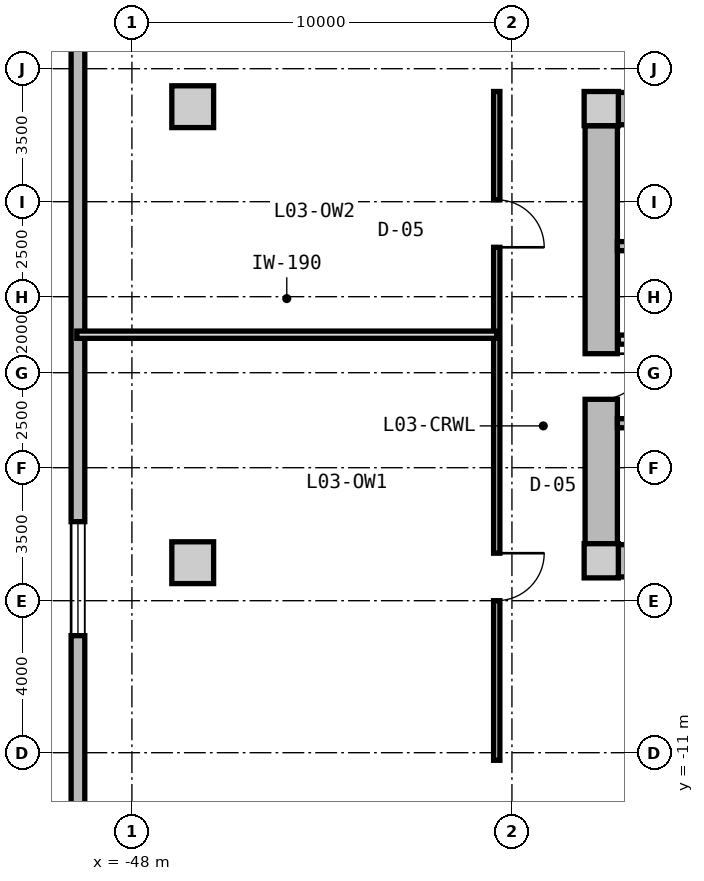
"""IFC4 building model, lengths in metres.
Left out: names, types, materials, properties, quantities, classifications, styles, units other than length and angle.
Written with IfcOpenShell. Run it as: python <this file> out.ifc"""

import sys

from ifc_helpers import new_model, si_unit, direction, frame, frame_2d, origin, origin_2d, place, context, subcontext, project, spatial, rectangle, extrude, source, transform, mapped, element, fill, save


model = new_model("IFC4")
c1 = context("Model", 3, precision=1e-05, world=origin(), true_north=direction((0.0, 1.0)))
c2 = subcontext(c1, "Body", "Model", "MODEL_VIEW")
j1 = project(units=[si_unit("LENGTHUNIT", "METRE"), si_unit("PLANEANGLEUNIT", "RADIAN")], contexts=[c1])
p1 = place(None, origin())
s1 = spatial("IfcSite", under=j1, at=p1, CompositionType="ELEMENT")
p2 = place(p1, origin())
s2 = spatial("IfcBuilding", under=s1, at=p2, CompositionType="ELEMENT")
p3 = place(p2, frame((0.0, 0.0, 12.6)))
s3 = spatial("IfcBuildingStorey", under=s2, at=p3, CompositionType="ELEMENT", Elevation=12.6)
m1 = source(origin(), c2, "Body", "SweptSolid", [
    extrude(rectangle(XDim=0.9, YDim=0.9, at=origin_2d()), origin(), (0.0, 0.0, 1.0), 4.2),
])
for number, where, z_axis, x_axis in (
    (1, (-35.65, -5.95, 0.0), (0.0, 0.0, 1.0), (1.0, 0.0, 0.0)),
    (2, (-35.65, 5.95, 0.0), (0.0, 0.0, 1.0), (1.0, 0.0, 0.0)),
):
    element("IfcColumn", number, at=place(p3, frame(where, z_axis=z_axis, x_axis=x_axis)), inside=s3, PredefinedType="COLUMN", context=c2, shape_type="MappedRepresentation", body=[
        mapped(m1, transform((0.0, 0.0, 0.0), x_axis=(1.0, 0.0, 0.0), y_axis=(0.0, 1.0, 0.0), z_axis=(0.0, 0.0, 1.0), scale=1.0)),
    ])
m2 = source(origin(), c2, "Body", "SweptSolid", [
    extrude(rectangle(XDim=14.4, YDim=0.85, at=frame_2d((7.2, 0.0))), origin(), (0.0, 0.0, 1.0), 3.88),
])
for number, where, z_axis, x_axis in (
    (3, (-35.2, 5.95, 0.0), (0.0, 0.0, 1.0), (1.0, 0.0, 0.0)),
    (4, (-20.8, -5.95, 0.0), (0.0, 0.0, 1.0), (-1.0, 0.0, 0.0)),
):
    element("IfcWall", number, at=place(p3, frame(where, z_axis=z_axis, x_axis=x_axis)), inside=s3, PredefinedType="SHEAR", context=c2, shape_type="MappedRepresentation", body=[
        mapped(m2, transform((0.0, 0.0, 0.0), x_axis=(1.0, 0.0, 0.0), y_axis=(0.0, 1.0, 0.0), z_axis=(0.0, 0.0, 1.0), scale=1.0)),
    ])
m3 = source(origin(), c2, "Body", "SweptSolid", [
    extrude(rectangle(XDim=11.0, YDim=0.85, at=frame_2d((5.5, 0.0))), origin(), (0.0, 0.0, 1.0), 3.88),
])
p4 = place(p3, frame((-35.65, -5.5, 0.0), z_axis=(0.0, 0.0, 1.0), x_axis=(0.0, 1.0, 0.0)))
e5 = element("IfcWall", 5, at=p4, inside=s3, PredefinedType="SHEAR", context=c2, shape_type="MappedRepresentation", body=[
    mapped(m3, transform((0.0, 0.0, 0.0), x_axis=(1.0, 0.0, 0.0), y_axis=(0.0, 1.0, 0.0), z_axis=(0.0, 0.0, 1.0), scale=1.0)),
])
p5 = place(p4, frame((3.8, 0.0, 0.0)))
e6 = element("IfcOpeningElement", 6, at=p5, cuts=e5, PredefinedType="OPENING", context=c2, shape_type="SweptSolid", body=[
    extrude(rectangle(XDim=1.2, YDim=2.15, at=frame_2d((0.6, 1.075))), frame((0.0, 0.435, 0.0), z_axis=(0.0, -1.0, 0.0), x_axis=(1.0, 0.0, 0.0)), (0.0, 0.0, 1.0), 0.87),
])
m4 = source(origin(), c2, "Body", "SweptSolid", [
    extrude(rectangle(XDim=1.1, YDim=1.1, at=origin_2d()), origin(), (0.0, 0.0, 1.0), 4.2),
])
for number, where, z_axis, x_axis in (
    (7, (-46.4, -6.0, 0.0), (0.0, 0.0, 1.0), (1.0, 0.0, 0.0)),
    (8, (-46.4, 6.0, 0.0), (0.0, 0.0, 1.0), (1.0, 0.0, 0.0)),
):
    element("IfcColumn", number, at=place(p3, frame(where, z_axis=z_axis, x_axis=x_axis)), inside=s3, PredefinedType="COLUMN", context=c2, shape_type="MappedRepresentation", body=[
        mapped(m4, transform((0.0, 0.0, 0.0), x_axis=(1.0, 0.0, 0.0), y_axis=(0.0, 1.0, 0.0), z_axis=(0.0, 0.0, 1.0), scale=1.0)),
    ])
m5 = source(origin(), c2, "Body", "SweptSolid", [
    extrude(rectangle(XDim=40.64, YDim=0.36, at=frame_2d((20.32, 0.0))), origin(), (0.0, 0.0, 1.0), 3.88),
])
p6 = place(p3, frame((-49.42, -20.32, 0.0), z_axis=(0.0, 0.0, 1.0), x_axis=(0.0, 1.0, 0.0)))
e9 = element("IfcWall", 9, at=p6, inside=s3, PredefinedType="SOLIDWALL", context=c2, shape_type="MappedRepresentation", body=[
    mapped(m5, transform((0.0, 0.0, 0.0), x_axis=(1.0, 0.0, 0.0), y_axis=(0.0, 1.0, 0.0), z_axis=(0.0, 0.0, 1.0), scale=1.0)),
])
p7 = place(p6, frame((12.4, 0.0, 0.85)))
e10 = element("IfcOpeningElement", 10, at=p7, cuts=e9, PredefinedType="OPENING", context=c2, shape_type="SweptSolid", body=[
    extrude(rectangle(XDim=3.0, YDim=2.1, at=frame_2d((1.5, 1.05))), frame((0.0, 0.19, 0.0), z_axis=(0.0, -1.0, 0.0), x_axis=(1.0, 0.0, 0.0)), (0.0, 0.0, 1.0), 0.38),
])
m6 = source(origin(), c2, "Body", "SweptSolid", [
    extrude(rectangle(XDim=7.765, YDim=0.24, at=frame_2d((3.883, 0.0))), origin(), (0.0, 0.0, 1.0), 3.88),
])
p8 = place(p3, frame((-35.225, 2.33, 0.0), z_axis=(0.0, 0.0, 1.0), x_axis=(1.0, 0.0, 0.0)))
e11 = element("IfcWall", 11, at=p8, inside=s3, PredefinedType="PARTITIONING", context=c2, shape_type="MappedRepresentation", body=[
    mapped(m6, transform((0.0, 0.0, 0.0), x_axis=(1.0, 0.0, 0.0), y_axis=(0.0, 1.0, 0.0), z_axis=(0.0, 0.0, 1.0), scale=1.0)),
])
p9 = place(p3, frame((-35.225, -2.33, 0.0), z_axis=(0.0, 0.0, 1.0), x_axis=(1.0, 0.0, 0.0)))
e12 = element("IfcWall", 12, at=p9, inside=s3, PredefinedType="PARTITIONING", context=c2, shape_type="MappedRepresentation", body=[
    mapped(m6, transform((0.0, 0.0, 0.0), x_axis=(1.0, 0.0, 0.0), y_axis=(0.0, 1.0, 0.0), z_axis=(0.0, 0.0, 1.0), scale=1.0)),
])
p10 = place(p9, frame((0.885, 0.0, 0.0)))
e13 = element("IfcOpeningElement", 13, at=p10, cuts=e12, PredefinedType="OPENING", context=c2, shape_type="SweptSolid", body=[
    extrude(rectangle(XDim=1.1, YDim=2.15, at=frame_2d((0.55, 1.075))), frame((0.0, 0.13, 0.0), z_axis=(0.0, -1.0, 0.0), x_axis=(1.0, 0.0, 0.0)), (0.0, 0.0, 1.0), 0.26),
])
m7 = source(origin(), c2, "Body", "SweptSolid", [
    extrude(rectangle(XDim=7.62, YDim=0.24, at=frame_2d((3.81, 0.0))), origin(), (0.0, 0.0, 1.0), 3.865),
])
p11 = place(p3, frame((-35.2, -0.13, 0.0), z_axis=(0.0, 0.0, 1.0), x_axis=(1.0, 0.0, 0.0)))
e14 = element("IfcWall", 14, at=p11, inside=s3, PredefinedType="PARTITIONING", context=c2, shape_type="MappedRepresentation", body=[
    mapped(m7, transform((0.0, 0.0, 0.0), x_axis=(1.0, 0.0, 0.0), y_axis=(0.0, 1.0, 0.0), z_axis=(0.0, 0.0, 1.0), scale=1.0)),
])
p12 = place(p11, frame((6.22, 0.0, 0.0)))
e15 = element("IfcOpeningElement", 15, at=p12, cuts=e14, PredefinedType="OPENING", context=c2, shape_type="SweptSolid", body=[
    extrude(rectangle(XDim=1.0, YDim=2.1, at=frame_2d((0.5, 1.05))), frame((0.0, 0.13, 0.0), z_axis=(0.0, -1.0, 0.0), x_axis=(1.0, 0.0, 0.0)), (0.0, 0.0, 1.0), 0.26),
])
p13 = place(p11, frame((0.85, 0.0, 0.0)))
e16 = element("IfcOpeningElement", 16, at=p13, cuts=e14, PredefinedType="OPENING", context=c2, shape_type="SweptSolid", body=[
    extrude(rectangle(XDim=1.1, YDim=2.2, at=frame_2d((0.55, 1.1))), frame((0.0, 0.13, 0.0), z_axis=(0.0, -1.0, 0.0), x_axis=(1.0, 0.0, 0.0)), (0.0, 0.0, 1.0), 0.26),
])
p14 = place(p11, frame((3.85, 0.0, 0.0)))
e17 = element("IfcOpeningElement", 17, at=p14, cuts=e14, PredefinedType="OPENING", context=c2, shape_type="SweptSolid", body=[
    extrude(rectangle(XDim=1.1, YDim=2.2, at=frame_2d((0.55, 1.1))), frame((0.0, 0.13, 0.0), z_axis=(0.0, -1.0, 0.0), x_axis=(1.0, 0.0, 0.0)), (0.0, 0.0, 1.0), 0.26),
])
m8 = source(origin(), c2, "Body", "SweptSolid", [
    extrude(rectangle(XDim=17.6, YDim=0.165, at=frame_2d((8.8, 0.0))), origin(), (0.0, 0.0, 1.0), 3.865),
])
p15 = place(p3, frame((-38.4, -11.2, 0.0), z_axis=(0.0, 0.0, 1.0), x_axis=(0.0, 1.0, 0.0)))
e18 = element("IfcWall", 18, at=p15, inside=s3, PredefinedType="PARTITIONING", context=c2, shape_type="MappedRepresentation", body=[
    mapped(m8, transform((0.0, 0.0, 0.0), x_axis=(1.0, 0.0, 0.0), y_axis=(0.0, 1.0, 0.0), z_axis=(0.0, 0.0, 1.0), scale=1.0)),
])
p16 = place(p15, frame((4.2, 0.0, 0.0)))
e19 = element("IfcOpeningElement", 19, at=p16, cuts=e18, PredefinedType="OPENING", context=c2, shape_type="SweptSolid", body=[
    extrude(rectangle(XDim=1.25, YDim=2.2, at=frame_2d((0.625, 1.1))), frame((0.0, 0.093, 0.0), z_axis=(0.0, -1.0, 0.0), x_axis=(1.0, 0.0, 0.0)), (0.0, 0.0, 1.0), 0.185),
])
p17 = place(p15, frame((13.5, 0.0, 0.0)))
e20 = element("IfcOpeningElement", 20, at=p17, cuts=e18, PredefinedType="OPENING", context=c2, shape_type="SweptSolid", body=[
    extrude(rectangle(XDim=1.25, YDim=2.2, at=frame_2d((0.625, 1.1))), frame((0.0, 0.093, 0.0), z_axis=(0.0, -1.0, 0.0), x_axis=(1.0, 0.0, 0.0)), (0.0, 0.0, 1.0), 0.185),
])
m9 = source(origin(), c2, "Body", "SweptSolid", [
    extrude(rectangle(XDim=11.05, YDim=0.19, at=frame_2d((5.525, 0.0))), origin(), (0.0, 0.0, 1.0), 3.865),
])
p18 = place(p3, frame((-49.45, 0.0, 0.0), z_axis=(0.0, 0.0, 1.0), x_axis=(1.0, 0.0, 0.0)))
e21 = element("IfcWall", 21, at=p18, inside=s3, PredefinedType="PARTITIONING", context=c2, shape_type="MappedRepresentation", body=[
    mapped(m9, transform((0.0, 0.0, 0.0), x_axis=(1.0, 0.0, 0.0), y_axis=(0.0, 1.0, 0.0), z_axis=(0.0, 0.0, 1.0), scale=1.0)),
])
m10 = source(origin(), c2, "Body", "SweptSolid", [
    extrude(rectangle(XDim=3.0, YDim=2.1, at=frame_2d((1.5, 1.05))), frame((0.0, 0.03, 0.0), z_axis=(0.0, -1.0, 0.0), x_axis=(1.0, 0.0, 0.0)), (0.0, 0.0, 1.0), 0.06),
])
p19 = place(p7, origin())
e22 = element("IfcWindow", 22, at=p19, inside=s3, PartitioningType="SINGLE_PANEL", PredefinedType="WINDOW", context=c2, shape_type="MappedRepresentation", body=[
    mapped(m10, transform((0.0, 0.0, 0.0), x_axis=(1.0, 0.0, 0.0), y_axis=(0.0, 1.0, 0.0), z_axis=(0.0, 0.0, 1.0), scale=1.0)),
])
fill(e10, e22)
m11 = source(origin(), c2, "Body", "SweptSolid", [
    extrude(rectangle(XDim=1.2, YDim=2.15, at=frame_2d((0.6, 1.075))), frame((0.0, 0.025, 0.0), z_axis=(0.0, -1.0, 0.0), x_axis=(1.0, 0.0, 0.0)), (0.0, 0.0, 1.0), 0.05),
])
p20 = place(p5, frame((1.2, 0.0, 0.0), z_axis=(0.0, 0.0, 1.0), x_axis=(-1.0, 0.0, 0.0)))
e23 = element("IfcDoor", 23, at=p20, inside=s3, OperationType="SINGLE_SWING_LEFT", PredefinedType="DOOR", context=c2, shape_type="MappedRepresentation", body=[
    mapped(m11, transform((0.0, 0.0, 0.0), x_axis=(1.0, 0.0, 0.0), y_axis=(0.0, 1.0, 0.0), z_axis=(0.0, 0.0, 1.0), scale=1.0)),
])
fill(e6, e23)
m12 = source(origin(), c2, "Body", "SweptSolid", [
    extrude(rectangle(XDim=1.25, YDim=2.2, at=frame_2d((0.625, 1.1))), frame((0.0, 0.025, 0.0), z_axis=(0.0, -1.0, 0.0), x_axis=(1.0, 0.0, 0.0)), (0.0, 0.0, 1.0), 0.05),
])
p21 = place(p16, frame((1.25, 0.0, 0.0), z_axis=(0.0, 0.0, 1.0), x_axis=(-1.0, 0.0, 0.0)))
e24 = element("IfcDoor", 24, at=p21, inside=s3, OperationType="SINGLE_SWING_LEFT", PredefinedType="DOOR", context=c2, shape_type="MappedRepresentation", body=[
    mapped(m12, transform((0.0, 0.0, 0.0), x_axis=(1.0, 0.0, 0.0), y_axis=(0.0, 1.0, 0.0), z_axis=(0.0, 0.0, 1.0), scale=1.0)),
])
fill(e19, e24)
p22 = place(p17, frame((1.25, 0.0, 0.0), z_axis=(0.0, 0.0, 1.0), x_axis=(-1.0, 0.0, 0.0)))
e25 = element("IfcDoor", 25, at=p22, inside=s3, OperationType="SINGLE_SWING_RIGHT", PredefinedType="DOOR", context=c2, shape_type="MappedRepresentation", body=[
    mapped(m12, transform((0.0, 0.0, 0.0), x_axis=(1.0, 0.0, 0.0), y_axis=(0.0, 1.0, 0.0), z_axis=(0.0, 0.0, 1.0), scale=1.0)),
])
fill(e20, e25)
save(model, sys.argv[1])
